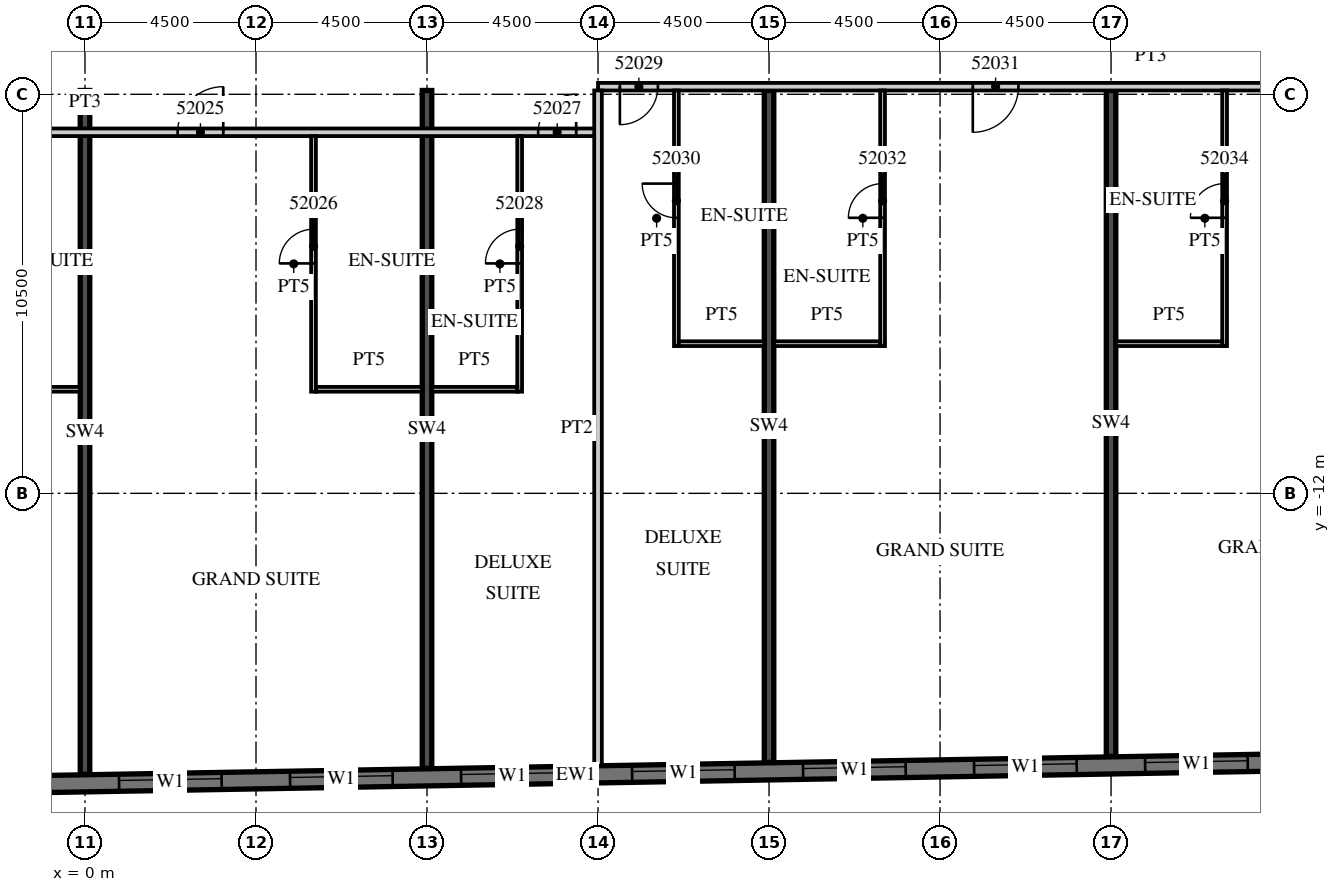
"""IFC4 building model, lengths in metres.
Left out: names, types, materials, properties, quantities, classifications, styles, units other than length and angle.
Written with IfcOpenShell. Run it as: python <this file> out.ifc"""

import sys

from ifc_helpers import new_model, si_unit, direction, frame, frame_2d, origin, place, context, subcontext, project, spatial, rectangle, extrude, element, fill, save


model = new_model("IFC4")
c1 = context("Model", 3, precision=1e-05, world=origin(), true_north=direction((0.0, 1.0)))
c2 = subcontext(c1, "Body", "Model", "MODEL_VIEW")
j1 = project(units=[si_unit("LENGTHUNIT", "METRE"), si_unit("PLANEANGLEUNIT", "RADIAN")], contexts=[c1])
p1 = place(None, origin())
s1 = spatial("IfcSite", under=j1, at=p1, CompositionType="ELEMENT")
p2 = place(p1, origin())
s2 = spatial("IfcBuilding", under=s1, at=p2, CompositionType="ELEMENT")
p3 = place(p2, frame((0.0, 0.0, 217.7)))
s3 = spatial("IfcBuildingStorey", under=s2, at=p3, CompositionType="ELEMENT", Elevation=217.7)
p4 = place(p3, frame((0.0, -19.393, 0.0), z_axis=(0.0, 0.0, 1.0), x_axis=(0.0, 1.0, 0.0)))
e1 = element("IfcWall", 1, at=p4, inside=s3, PredefinedType="SHEAR", context=c2, shape_type="SweptSolid", body=[
    extrude(rectangle(XDim=17.993, YDim=0.25, at=frame_2d((8.997, 0.0))), origin(), (0.0, 0.0, 1.0), 3.3),
])
p5 = place(p3, frame((9.0, -19.236, 0.0), z_axis=(0.0, 0.0, 1.0), x_axis=(0.0, 1.0, 0.0)))
e2 = element("IfcWall", 2, at=p5, inside=s3, PredefinedType="SHEAR", context=c2, shape_type="SweptSolid", body=[
    extrude(rectangle(XDim=17.836, YDim=0.25, at=frame_2d((8.918, 0.0))), origin(), (0.0, 0.0, 1.0), 3.3),
])
p6 = place(p3, frame((18.0, -19.079, 0.0), z_axis=(0.0, 0.0, 1.0), x_axis=(0.0, 1.0, 0.0)))
e3 = element("IfcWall", 3, at=p6, inside=s3, PredefinedType="SHEAR", context=c2, shape_type="SweptSolid", body=[
    extrude(rectangle(XDim=17.679, YDim=0.25, at=frame_2d((8.84, 0.0))), origin(), (0.0, 0.0, 1.0), 3.3),
])
p7 = place(p3, frame((27.0, -18.922, 0.0), z_axis=(0.0, 0.0, 1.0), x_axis=(0.0, 1.0, 0.0)))
e4 = element("IfcWall", 4, at=p7, inside=s3, PredefinedType="SHEAR", context=c2, shape_type="SweptSolid", body=[
    extrude(rectangle(XDim=17.522, YDim=0.25, at=frame_2d((8.761, 0.0))), origin(), (0.0, 0.0, 1.0), 3.3),
])
p8 = place(p3, frame((-13.504, -19.866, 0.0), z_axis=(0.0, 0.0, 1.0), x_axis=(0.999847672978, 0.017453676992, 0.0)))
e5 = element("IfcWall", 5, at=p8, inside=s3, PredefinedType="SOLIDWALL", context=c2, shape_type="SweptSolid", body=[
    extrude(rectangle(XDim=52.86, YDim=0.45, at=frame_2d((26.43, 0.0))), origin(), (0.0, 0.0, 1.0), 3.02),
])
p9 = place(p8, frame((0.9, 0.0, 0.45)))
e6 = element("IfcOpeningElement", 6, at=p9, cuts=e5, PredefinedType="OPENING", context=c2, shape_type="SweptSolid", body=[
    extrude(rectangle(XDim=2.7, YDim=2.25, at=frame_2d((1.35, 1.125))), frame((0.0, 0.235, 0.0), z_axis=(0.0, -1.0, 0.0), x_axis=(1.0, 0.0, 0.0)), (0.0, 0.0, 1.0), 0.47),
])
p10 = place(p8, frame((5.401, 0.0, 0.45)))
e7 = element("IfcOpeningElement", 7, at=p10, cuts=e5, PredefinedType="OPENING", context=c2, shape_type="SweptSolid", body=[
    extrude(rectangle(XDim=2.7, YDim=2.25, at=frame_2d((1.35, 1.125))), frame((0.0, 0.235, 0.0), z_axis=(0.0, -1.0, 0.0), x_axis=(1.0, 0.0, 0.0)), (0.0, 0.0, 1.0), 0.47),
])
p11 = place(p8, frame((9.902, 0.0, 0.45)))
e8 = element("IfcOpeningElement", 8, at=p11, cuts=e5, PredefinedType="OPENING", context=c2, shape_type="SweptSolid", body=[
    extrude(rectangle(XDim=2.7, YDim=2.25, at=frame_2d((1.35, 1.125))), frame((0.0, 0.235, 0.0), z_axis=(0.0, -1.0, 0.0), x_axis=(1.0, 0.0, 0.0)), (0.0, 0.0, 1.0), 0.47),
])
p12 = place(p8, frame((14.402, 0.0, 0.45)))
e9 = element("IfcOpeningElement", 9, at=p12, cuts=e5, PredefinedType="OPENING", context=c2, shape_type="SweptSolid", body=[
    extrude(rectangle(XDim=2.7, YDim=2.25, at=frame_2d((1.35, 1.125))), frame((0.0, 0.235, 0.0), z_axis=(0.0, -1.0, 0.0), x_axis=(1.0, 0.0, 0.0)), (0.0, 0.0, 1.0), 0.47),
])
p13 = place(p8, frame((18.903, 0.0, 0.45)))
e10 = element("IfcOpeningElement", 10, at=p13, cuts=e5, PredefinedType="OPENING", context=c2, shape_type="SweptSolid", body=[
    extrude(rectangle(XDim=2.7, YDim=2.25, at=frame_2d((1.35, 1.125))), frame((0.0, 0.235, 0.0), z_axis=(0.0, -1.0, 0.0), x_axis=(1.0, 0.0, 0.0)), (0.0, 0.0, 1.0), 0.47),
])
p14 = place(p8, frame((23.404, 0.0, 0.45)))
e11 = element("IfcOpeningElement", 11, at=p14, cuts=e5, PredefinedType="OPENING", context=c2, shape_type="SweptSolid", body=[
    extrude(rectangle(XDim=2.7, YDim=2.25, at=frame_2d((1.35, 1.125))), frame((0.0, 0.235, 0.0), z_axis=(0.0, -1.0, 0.0), x_axis=(1.0, 0.0, 0.0)), (0.0, 0.0, 1.0), 0.47),
])
p15 = place(p8, frame((27.904, 0.0, 0.45)))
e12 = element("IfcOpeningElement", 12, at=p15, cuts=e5, PredefinedType="OPENING", context=c2, shape_type="SweptSolid", body=[
    extrude(rectangle(XDim=2.7, YDim=2.25, at=frame_2d((1.35, 1.125))), frame((0.0, 0.235, 0.0), z_axis=(0.0, -1.0, 0.0), x_axis=(1.0, 0.0, 0.0)), (0.0, 0.0, 1.0), 0.47),
])
p16 = place(p8, frame((32.405, 0.0, 0.45)))
e13 = element("IfcOpeningElement", 13, at=p16, cuts=e5, PredefinedType="OPENING", context=c2, shape_type="SweptSolid", body=[
    extrude(rectangle(XDim=2.7, YDim=2.25, at=frame_2d((1.35, 1.125))), frame((0.0, 0.235, 0.0), z_axis=(0.0, -1.0, 0.0), x_axis=(1.0, 0.0, 0.0)), (0.0, 0.0, 1.0), 0.47),
])
p17 = place(p8, frame((36.906, 0.0, 0.45)))
e14 = element("IfcOpeningElement", 14, at=p17, cuts=e5, PredefinedType="OPENING", context=c2, shape_type="SweptSolid", body=[
    extrude(rectangle(XDim=2.7, YDim=2.25, at=frame_2d((1.35, 1.125))), frame((0.0, 0.235, 0.0), z_axis=(0.0, -1.0, 0.0), x_axis=(1.0, 0.0, 0.0)), (0.0, 0.0, 1.0), 0.47),
])
p18 = place(p8, frame((41.406, 0.0, 0.45)))
e15 = element("IfcOpeningElement", 15, at=p18, cuts=e5, PredefinedType="OPENING", context=c2, shape_type="SweptSolid", body=[
    extrude(rectangle(XDim=2.7, YDim=2.25, at=frame_2d((1.35, 1.125))), frame((0.0, 0.235, 0.0), z_axis=(0.0, -1.0, 0.0), x_axis=(1.0, 0.0, 0.0)), (0.0, 0.0, 1.0), 0.47),
])
p19 = place(p8, frame((45.907, 0.0, 0.45)))
e16 = element("IfcOpeningElement", 16, at=p19, cuts=e5, PredefinedType="OPENING", context=c2, shape_type="SweptSolid", body=[
    extrude(rectangle(XDim=2.7, YDim=2.25, at=frame_2d((1.35, 1.125))), frame((0.0, 0.235, 0.0), z_axis=(0.0, -1.0, 0.0), x_axis=(1.0, 0.0, 0.0)), (0.0, 0.0, 1.0), 0.47),
])
p20 = place(p3, frame((-13.5, -2.5, 0.0), z_axis=(0.0, 0.0, 1.0), x_axis=(1.0, 0.0, 0.0)))
e17 = element("IfcWall", 17, at=p20, inside=s3, PredefinedType="PARTITIONING", context=c2, shape_type="SweptSolid", body=[
    extrude(rectangle(XDim=27.0, YDim=0.2, at=frame_2d((13.5, 0.0))), origin(), (0.0, 0.0, 1.0), 3.02),
])
p21 = place(p20, frame((0.575, 0.0, 0.0)))
e18 = element("IfcOpeningElement", 18, at=p21, cuts=e17, PredefinedType="OPENING", context=c2, shape_type="SweptSolid", body=[
    extrude(rectangle(XDim=1.0, YDim=2.1, at=frame_2d((0.5, 1.05))), frame((0.0, 0.11, 0.0), z_axis=(0.0, -1.0, 0.0), x_axis=(1.0, 0.0, 0.0)), (0.0, 0.0, 1.0), 0.22),
])
p22 = place(p20, frame((6.938, 0.0, 0.0)))
e19 = element("IfcOpeningElement", 19, at=p22, cuts=e17, PredefinedType="OPENING", context=c2, shape_type="SweptSolid", body=[
    extrude(rectangle(XDim=1.2, YDim=2.1, at=frame_2d((0.6, 1.05))), frame((0.0, 0.11, 0.0), z_axis=(0.0, -1.0, 0.0), x_axis=(1.0, 0.0, 0.0)), (0.0, 0.0, 1.0), 0.22),
])
p23 = place(p20, frame((15.938, 0.0, 0.0)))
e20 = element("IfcOpeningElement", 20, at=p23, cuts=e17, PredefinedType="OPENING", context=c2, shape_type="SweptSolid", body=[
    extrude(rectangle(XDim=1.2, YDim=2.1, at=frame_2d((0.6, 1.05))), frame((0.0, 0.11, 0.0), z_axis=(0.0, -1.0, 0.0), x_axis=(1.0, 0.0, 0.0)), (0.0, 0.0, 1.0), 0.22),
])
p24 = place(p20, frame((25.425, 0.0, 0.0)))
e21 = element("IfcOpeningElement", 21, at=p24, cuts=e17, PredefinedType="OPENING", context=c2, shape_type="SweptSolid", body=[
    extrude(rectangle(XDim=1.0, YDim=2.1, at=frame_2d((0.5, 1.05))), frame((0.0, 0.11, 0.0), z_axis=(0.0, -1.0, 0.0), x_axis=(1.0, 0.0, 0.0)), (0.0, 0.0, 1.0), 0.22),
])
p25 = place(p3, frame((13.5, -1.3, 0.0), z_axis=(0.0, 0.0, 1.0), x_axis=(1.0, 0.0, 0.0)))
e22 = element("IfcWall", 22, at=p25, inside=s3, PredefinedType="PARTITIONING", context=c2, shape_type="SweptSolid", body=[
    extrude(rectangle(XDim=29.091, YDim=0.2, at=frame_2d((14.545, 0.0))), origin(), (0.0, 0.0, 1.0), 3.02),
])
p26 = place(p25, frame((0.575, 0.0, 0.0)))
e23 = element("IfcOpeningElement", 23, at=p26, cuts=e22, PredefinedType="OPENING", context=c2, shape_type="SweptSolid", body=[
    extrude(rectangle(XDim=1.0, YDim=2.1, at=frame_2d((0.5, 1.05))), frame((0.0, 0.11, 0.0), z_axis=(0.0, -1.0, 0.0), x_axis=(1.0, 0.0, 0.0)), (0.0, 0.0, 1.0), 0.22),
])
p27 = place(p25, frame((9.862, 0.0, 0.0)))
e24 = element("IfcOpeningElement", 24, at=p27, cuts=e22, PredefinedType="OPENING", context=c2, shape_type="SweptSolid", body=[
    extrude(rectangle(XDim=1.2, YDim=2.1, at=frame_2d((0.6, 1.05))), frame((0.0, 0.11, 0.0), z_axis=(0.0, -1.0, 0.0), x_axis=(1.0, 0.0, 0.0)), (0.0, 0.0, 1.0), 0.22),
])
p28 = place(p25, frame((18.862, 0.0, 0.0)))
e25 = element("IfcOpeningElement", 25, at=p28, cuts=e22, PredefinedType="OPENING", context=c2, shape_type="SweptSolid", body=[
    extrude(rectangle(XDim=1.2, YDim=2.1, at=frame_2d((0.6, 1.05))), frame((0.0, 0.11, 0.0), z_axis=(0.0, -1.0, 0.0), x_axis=(1.0, 0.0, 0.0)), (0.0, 0.0, 1.0), 0.22),
])
p29 = place(p25, frame((23.075, 0.0, 0.0)))
e26 = element("IfcOpeningElement", 26, at=p29, cuts=e22, PredefinedType="OPENING", context=c2, shape_type="SweptSolid", body=[
    extrude(rectangle(XDim=1.0, YDim=2.1, at=frame_2d((0.5, 1.05))), frame((0.0, 0.11, 0.0), z_axis=(0.0, -1.0, 0.0), x_axis=(1.0, 0.0, 0.0)), (0.0, 0.0, 1.0), 0.22),
])
p30 = place(p25, frame((27.611, 0.0, 0.0)))
e27 = element("IfcOpeningElement", 27, at=p30, cuts=e22, PredefinedType="OPENING", context=c2, shape_type="SweptSolid", body=[
    extrude(rectangle(XDim=1.0, YDim=2.4, at=frame_2d((0.5, 1.2))), frame((0.0, 0.11, 0.0), z_axis=(0.0, -1.0, 0.0), x_axis=(1.0, 0.0, 0.0)), (0.0, 0.0, 1.0), 0.22),
])
p31 = place(p3, frame((-2.925, -9.262, 0.0), z_axis=(0.0, 0.0, 1.0), x_axis=(1.0, 0.0, 0.0)))
e28 = element("IfcWall", 28, at=p31, inside=s3, PredefinedType="PARTITIONING", context=c2, shape_type="SweptSolid", body=[
    extrude(rectangle(XDim=2.8, YDim=0.125, at=frame_2d((1.4, 0.0))), origin(), (0.0, 0.0, 1.0), 3.02),
])
p32 = place(p3, frame((6.013, -9.325, 0.0), z_axis=(0.0, 0.0, 1.0), x_axis=(0.0, 1.0, 0.0)))
e29 = element("IfcWall", 29, at=p32, inside=s3, PredefinedType="PARTITIONING", context=c2, shape_type="SweptSolid", body=[
    extrude(rectangle(XDim=6.725, YDim=0.125, at=frame_2d((3.362, 0.0))), origin(), (0.0, 0.0, 1.0), 3.02),
])
p33 = place(p32, frame((3.375, 0.0, 0.0)))
e30 = element("IfcOpeningElement", 30, at=p33, cuts=e29, PredefinedType="OPENING", context=c2, shape_type="SweptSolid", body=[
    extrude(rectangle(XDim=0.9, YDim=2.1, at=frame_2d((0.45, 1.05))), frame((0.0, 0.073, 0.0), z_axis=(0.0, -1.0, 0.0), x_axis=(1.0, 0.0, 0.0)), (0.0, 0.0, 1.0), 0.145),
])
p34 = place(p3, frame((6.075, -9.262, 0.0), z_axis=(0.0, 0.0, 1.0), x_axis=(1.0, 0.0, 0.0)))
e31 = element("IfcWall", 31, at=p34, inside=s3, PredefinedType="PARTITIONING", context=c2, shape_type="SweptSolid", body=[
    extrude(rectangle(XDim=2.8, YDim=0.125, at=frame_2d((1.4, 0.0))), origin(), (0.0, 0.0, 1.0), 3.02),
])
p35 = place(p3, frame((13.5, -19.17, 0.0), z_axis=(0.0, 0.0, 1.0), x_axis=(0.0, 1.0, 0.0)))
e32 = element("IfcWall", 32, at=p35, inside=s3, PredefinedType="PARTITIONING", context=c2, shape_type="SweptSolid", body=[
    extrude(rectangle(XDim=17.77, YDim=0.2, at=frame_2d((8.885, 0.0))), origin(), (0.0, 0.0, 1.0), 3.02),
])
p36 = place(p3, frame((11.438, -9.325, 0.0), z_axis=(0.0, 0.0, 1.0), x_axis=(0.0, 1.0, 0.0)))
e33 = element("IfcWall", 33, at=p36, inside=s3, PredefinedType="PARTITIONING", context=c2, shape_type="SweptSolid", body=[
    extrude(rectangle(XDim=6.725, YDim=0.125, at=frame_2d((3.362, 0.0))), origin(), (0.0, 0.0, 1.0), 3.02),
])
p37 = place(p36, frame((3.375, 0.0, 0.0)))
e34 = element("IfcOpeningElement", 34, at=p37, cuts=e33, PredefinedType="OPENING", context=c2, shape_type="SweptSolid", body=[
    extrude(rectangle(XDim=0.9, YDim=2.1, at=frame_2d((0.45, 1.05))), frame((0.0, 0.073, 0.0), z_axis=(0.0, -1.0, 0.0), x_axis=(1.0, 0.0, 0.0)), (0.0, 0.0, 1.0), 0.145),
])
p38 = place(p3, frame((9.125, -9.262, 0.0), z_axis=(0.0, 0.0, 1.0), x_axis=(1.0, 0.0, 0.0)))
e35 = element("IfcWall", 35, at=p38, inside=s3, PredefinedType="PARTITIONING", context=c2, shape_type="SweptSolid", body=[
    extrude(rectangle(XDim=2.25, YDim=0.125, at=frame_2d((1.125, 0.0))), origin(), (0.0, 0.0, 1.0), 3.02),
])
p39 = place(p3, frame((15.562, -8.125, 0.0), z_axis=(0.0, 0.0, 1.0), x_axis=(0.0, 1.0, 0.0)))
e36 = element("IfcWall", 36, at=p39, inside=s3, PredefinedType="PARTITIONING", context=c2, shape_type="SweptSolid", body=[
    extrude(rectangle(XDim=6.725, YDim=0.125, at=frame_2d((3.363, 0.0))), origin(), (0.0, 0.0, 1.0), 3.02),
])
p40 = place(p39, frame((3.375, 0.0, 0.0)))
e37 = element("IfcOpeningElement", 37, at=p40, cuts=e36, PredefinedType="OPENING", context=c2, shape_type="SweptSolid", body=[
    extrude(rectangle(XDim=0.9, YDim=2.1, at=frame_2d((0.45, 1.05))), frame((0.0, 0.073, 0.0), z_axis=(0.0, -1.0, 0.0), x_axis=(1.0, 0.0, 0.0)), (0.0, 0.0, 1.0), 0.145),
])
p41 = place(p3, frame((15.625, -8.062, 0.0), z_axis=(0.0, 0.0, 1.0), x_axis=(1.0, 0.0, 0.0)))
e38 = element("IfcWall", 38, at=p41, inside=s3, PredefinedType="PARTITIONING", context=c2, shape_type="SweptSolid", body=[
    extrude(rectangle(XDim=2.25, YDim=0.125, at=frame_2d((1.125, 0.0))), origin(), (0.0, 0.0, 1.0), 3.02),
])
p42 = place(p3, frame((20.988, -8.125, 0.0), z_axis=(0.0, 0.0, 1.0), x_axis=(0.0, 1.0, 0.0)))
e39 = element("IfcWall", 39, at=p42, inside=s3, PredefinedType="PARTITIONING", context=c2, shape_type="SweptSolid", body=[
    extrude(rectangle(XDim=6.725, YDim=0.125, at=frame_2d((3.363, 0.0))), origin(), (0.0, 0.0, 1.0), 3.02),
])
p43 = place(p42, frame((3.375, 0.0, 0.0)))
e40 = element("IfcOpeningElement", 40, at=p43, cuts=e39, PredefinedType="OPENING", context=c2, shape_type="SweptSolid", body=[
    extrude(rectangle(XDim=0.9, YDim=2.1, at=frame_2d((0.45, 1.05))), frame((0.0, 0.073, 0.0), z_axis=(0.0, -1.0, 0.0), x_axis=(1.0, 0.0, 0.0)), (0.0, 0.0, 1.0), 0.145),
])
p44 = place(p3, frame((18.125, -8.062, 0.0), z_axis=(0.0, 0.0, 1.0), x_axis=(1.0, 0.0, 0.0)))
e41 = element("IfcWall", 41, at=p44, inside=s3, PredefinedType="PARTITIONING", context=c2, shape_type="SweptSolid", body=[
    extrude(rectangle(XDim=2.8, YDim=0.125, at=frame_2d((1.4, 0.0))), origin(), (0.0, 0.0, 1.0), 3.02),
])
p45 = place(p3, frame((29.988, -8.125, 0.0), z_axis=(0.0, 0.0, 1.0), x_axis=(0.0, 1.0, 0.0)))
e42 = element("IfcWall", 42, at=p45, inside=s3, PredefinedType="PARTITIONING", context=c2, shape_type="SweptSolid", body=[
    extrude(rectangle(XDim=6.725, YDim=0.125, at=frame_2d((3.363, 0.0))), origin(), (0.0, 0.0, 1.0), 3.02),
])
p46 = place(p45, frame((3.375, 0.0, 0.0)))
e43 = element("IfcOpeningElement", 43, at=p46, cuts=e42, PredefinedType="OPENING", context=c2, shape_type="SweptSolid", body=[
    extrude(rectangle(XDim=0.9, YDim=2.1, at=frame_2d((0.45, 1.05))), frame((0.0, 0.073, 0.0), z_axis=(0.0, -1.0, 0.0), x_axis=(1.0, 0.0, 0.0)), (0.0, 0.0, 1.0), 0.145),
])
p47 = place(p3, frame((27.125, -8.062, 0.0), z_axis=(0.0, 0.0, 1.0), x_axis=(1.0, 0.0, 0.0)))
e44 = element("IfcWall", 44, at=p47, inside=s3, PredefinedType="PARTITIONING", context=c2, shape_type="SweptSolid", body=[
    extrude(rectangle(XDim=2.8, YDim=0.125, at=frame_2d((1.4, 0.0))), origin(), (0.0, 0.0, 1.0), 3.02),
])
p48 = place(p12, origin())
e45 = element("IfcWindow", 45, at=p48, inside=s3, PartitioningType="SINGLE_PANEL", PredefinedType="WINDOW", context=c2, shape_type="SweptSolid", body=[
    extrude(rectangle(XDim=2.7, YDim=2.25, at=frame_2d((1.35, 1.125))), frame((0.0, 0.09, 0.0), z_axis=(0.0, -1.0, 0.0), x_axis=(1.0, 0.0, 0.0)), (0.0, 0.0, 1.0), 0.06),
])
fill(e9, e45)
p49 = place(p13, origin())
e46 = element("IfcWindow", 46, at=p49, inside=s3, PartitioningType="SINGLE_PANEL", PredefinedType="WINDOW", context=c2, shape_type="SweptSolid", body=[
    extrude(rectangle(XDim=2.7, YDim=2.25, at=frame_2d((1.35, 1.125))), frame((0.0, 0.09, 0.0), z_axis=(0.0, -1.0, 0.0), x_axis=(1.0, 0.0, 0.0)), (0.0, 0.0, 1.0), 0.06),
])
fill(e10, e46)
p50 = place(p14, origin())
e47 = element("IfcWindow", 47, at=p50, inside=s3, PartitioningType="SINGLE_PANEL", PredefinedType="WINDOW", context=c2, shape_type="SweptSolid", body=[
    extrude(rectangle(XDim=2.7, YDim=2.25, at=frame_2d((1.35, 1.125))), frame((0.0, 0.09, 0.0), z_axis=(0.0, -1.0, 0.0), x_axis=(1.0, 0.0, 0.0)), (0.0, 0.0, 1.0), 0.06),
])
fill(e11, e47)
p51 = place(p15, origin())
e48 = element("IfcWindow", 48, at=p51, inside=s3, PartitioningType="SINGLE_PANEL", PredefinedType="WINDOW", context=c2, shape_type="SweptSolid", body=[
    extrude(rectangle(XDim=2.7, YDim=2.25, at=frame_2d((1.35, 1.125))), frame((0.0, 0.09, 0.0), z_axis=(0.0, -1.0, 0.0), x_axis=(1.0, 0.0, 0.0)), (0.0, 0.0, 1.0), 0.06),
])
fill(e12, e48)
p52 = place(p16, origin())
e49 = element("IfcWindow", 49, at=p52, inside=s3, PartitioningType="SINGLE_PANEL", PredefinedType="WINDOW", context=c2, shape_type="SweptSolid", body=[
    extrude(rectangle(XDim=2.7, YDim=2.25, at=frame_2d((1.35, 1.125))), frame((0.0, 0.09, 0.0), z_axis=(0.0, -1.0, 0.0), x_axis=(1.0, 0.0, 0.0)), (0.0, 0.0, 1.0), 0.06),
])
fill(e13, e49)
p53 = place(p17, origin())
e50 = element("IfcWindow", 50, at=p53, inside=s3, PartitioningType="SINGLE_PANEL", PredefinedType="WINDOW", context=c2, shape_type="SweptSolid", body=[
    extrude(rectangle(XDim=2.7, YDim=2.25, at=frame_2d((1.35, 1.125))), frame((0.0, 0.09, 0.0), z_axis=(0.0, -1.0, 0.0), x_axis=(1.0, 0.0, 0.0)), (0.0, 0.0, 1.0), 0.06),
])
fill(e14, e50)
p54 = place(p18, origin())
e51 = element("IfcWindow", 51, at=p54, inside=s3, PartitioningType="SINGLE_PANEL", PredefinedType="WINDOW", context=c2, shape_type="SweptSolid", body=[
    extrude(rectangle(XDim=2.7, YDim=2.25, at=frame_2d((1.35, 1.125))), frame((0.0, 0.09, 0.0), z_axis=(0.0, -1.0, 0.0), x_axis=(1.0, 0.0, 0.0)), (0.0, 0.0, 1.0), 0.06),
])
fill(e15, e51)
p55 = place(p23, origin())
e52 = element("IfcDoor", 52, at=p55, inside=s3, OperationType="SINGLE_SWING_RIGHT", PredefinedType="DOOR", context=c2, shape_type="SweptSolid", body=[
    extrude(rectangle(XDim=1.2, YDim=2.1, at=frame_2d((0.6, 1.05))), frame((0.0, 0.025, 0.0), z_axis=(0.0, -1.0, 0.0), x_axis=(1.0, 0.0, 0.0)), (0.0, 0.0, 1.0), 0.05),
])
fill(e20, e52)
p56 = place(p33, origin())
e53 = element("IfcDoor", 53, at=p56, inside=s3, OperationType="SINGLE_SWING_LEFT", PredefinedType="DOOR", context=c2, shape_type="SweptSolid", body=[
    extrude(rectangle(XDim=0.9, YDim=2.1, at=frame_2d((0.45, 1.05))), frame((0.0, 0.025, 0.0), z_axis=(0.0, -1.0, 0.0), x_axis=(1.0, 0.0, 0.0)), (0.0, 0.0, 1.0), 0.05),
])
fill(e30, e53)
p57 = place(p24, origin())
e54 = element("IfcDoor", 54, at=p57, inside=s3, OperationType="SINGLE_SWING_RIGHT", PredefinedType="DOOR", context=c2, shape_type="SweptSolid", body=[
    extrude(rectangle(XDim=1.0, YDim=2.1, at=frame_2d((0.5, 1.05))), frame((0.0, 0.025, 0.0), z_axis=(0.0, -1.0, 0.0), x_axis=(1.0, 0.0, 0.0)), (0.0, 0.0, 1.0), 0.05),
])
fill(e21, e54)
p58 = place(p37, origin())
e55 = element("IfcDoor", 55, at=p58, inside=s3, OperationType="SINGLE_SWING_LEFT", PredefinedType="DOOR", context=c2, shape_type="SweptSolid", body=[
    extrude(rectangle(XDim=0.9, YDim=2.1, at=frame_2d((0.45, 1.05))), frame((0.0, 0.025, 0.0), z_axis=(0.0, -1.0, 0.0), x_axis=(1.0, 0.0, 0.0)), (0.0, 0.0, 1.0), 0.05),
])
fill(e34, e55)
p59 = place(p26, origin())
e56 = element("IfcDoor", 56, at=p59, inside=s3, OperationType="SINGLE_SWING_LEFT", PredefinedType="DOOR", context=c2, shape_type="SweptSolid", body=[
    extrude(rectangle(XDim=1.0, YDim=2.1, at=frame_2d((0.5, 1.05))), frame((0.0, 0.025, 0.0), z_axis=(0.0, -1.0, 0.0), x_axis=(1.0, 0.0, 0.0)), (0.0, 0.0, 1.0), 0.05),
])
fill(e23, e56)
p60 = place(p40, origin())
e57 = element("IfcDoor", 57, at=p60, inside=s3, OperationType="SINGLE_SWING_RIGHT", PredefinedType="DOOR", context=c2, shape_type="SweptSolid", body=[
    extrude(rectangle(XDim=0.9, YDim=2.1, at=frame_2d((0.45, 1.05))), frame((0.0, 0.025, 0.0), z_axis=(0.0, -1.0, 0.0), x_axis=(1.0, 0.0, 0.0)), (0.0, 0.0, 1.0), 0.05),
])
fill(e37, e57)
p61 = place(p27, origin())
e58 = element("IfcDoor", 58, at=p61, inside=s3, OperationType="SINGLE_SWING_LEFT", PredefinedType="DOOR", context=c2, shape_type="SweptSolid", body=[
    extrude(rectangle(XDim=1.2, YDim=2.1, at=frame_2d((0.6, 1.05))), frame((0.0, 0.025, 0.0), z_axis=(0.0, -1.0, 0.0), x_axis=(1.0, 0.0, 0.0)), (0.0, 0.0, 1.0), 0.05),
])
fill(e24, e58)
p62 = place(p43, origin())
e59 = element("IfcDoor", 59, at=p62, inside=s3, OperationType="SINGLE_SWING_LEFT", PredefinedType="DOOR", context=c2, shape_type="SweptSolid", body=[
    extrude(rectangle(XDim=0.9, YDim=2.1, at=frame_2d((0.45, 1.05))), frame((0.0, 0.025, 0.0), z_axis=(0.0, -1.0, 0.0), x_axis=(1.0, 0.0, 0.0)), (0.0, 0.0, 1.0), 0.05),
])
fill(e40, e59)
p63 = place(p46, origin())
e60 = element("IfcDoor", 60, at=p63, inside=s3, OperationType="SINGLE_SWING_LEFT", PredefinedType="DOOR", context=c2, shape_type="SweptSolid", body=[
    extrude(rectangle(XDim=0.9, YDim=2.1, at=frame_2d((0.45, 1.05))), frame((0.0, 0.025, 0.0), z_axis=(0.0, -1.0, 0.0), x_axis=(1.0, 0.0, 0.0)), (0.0, 0.0, 1.0), 0.05),
])
fill(e43, e60)
save(model, sys.argv[1])
